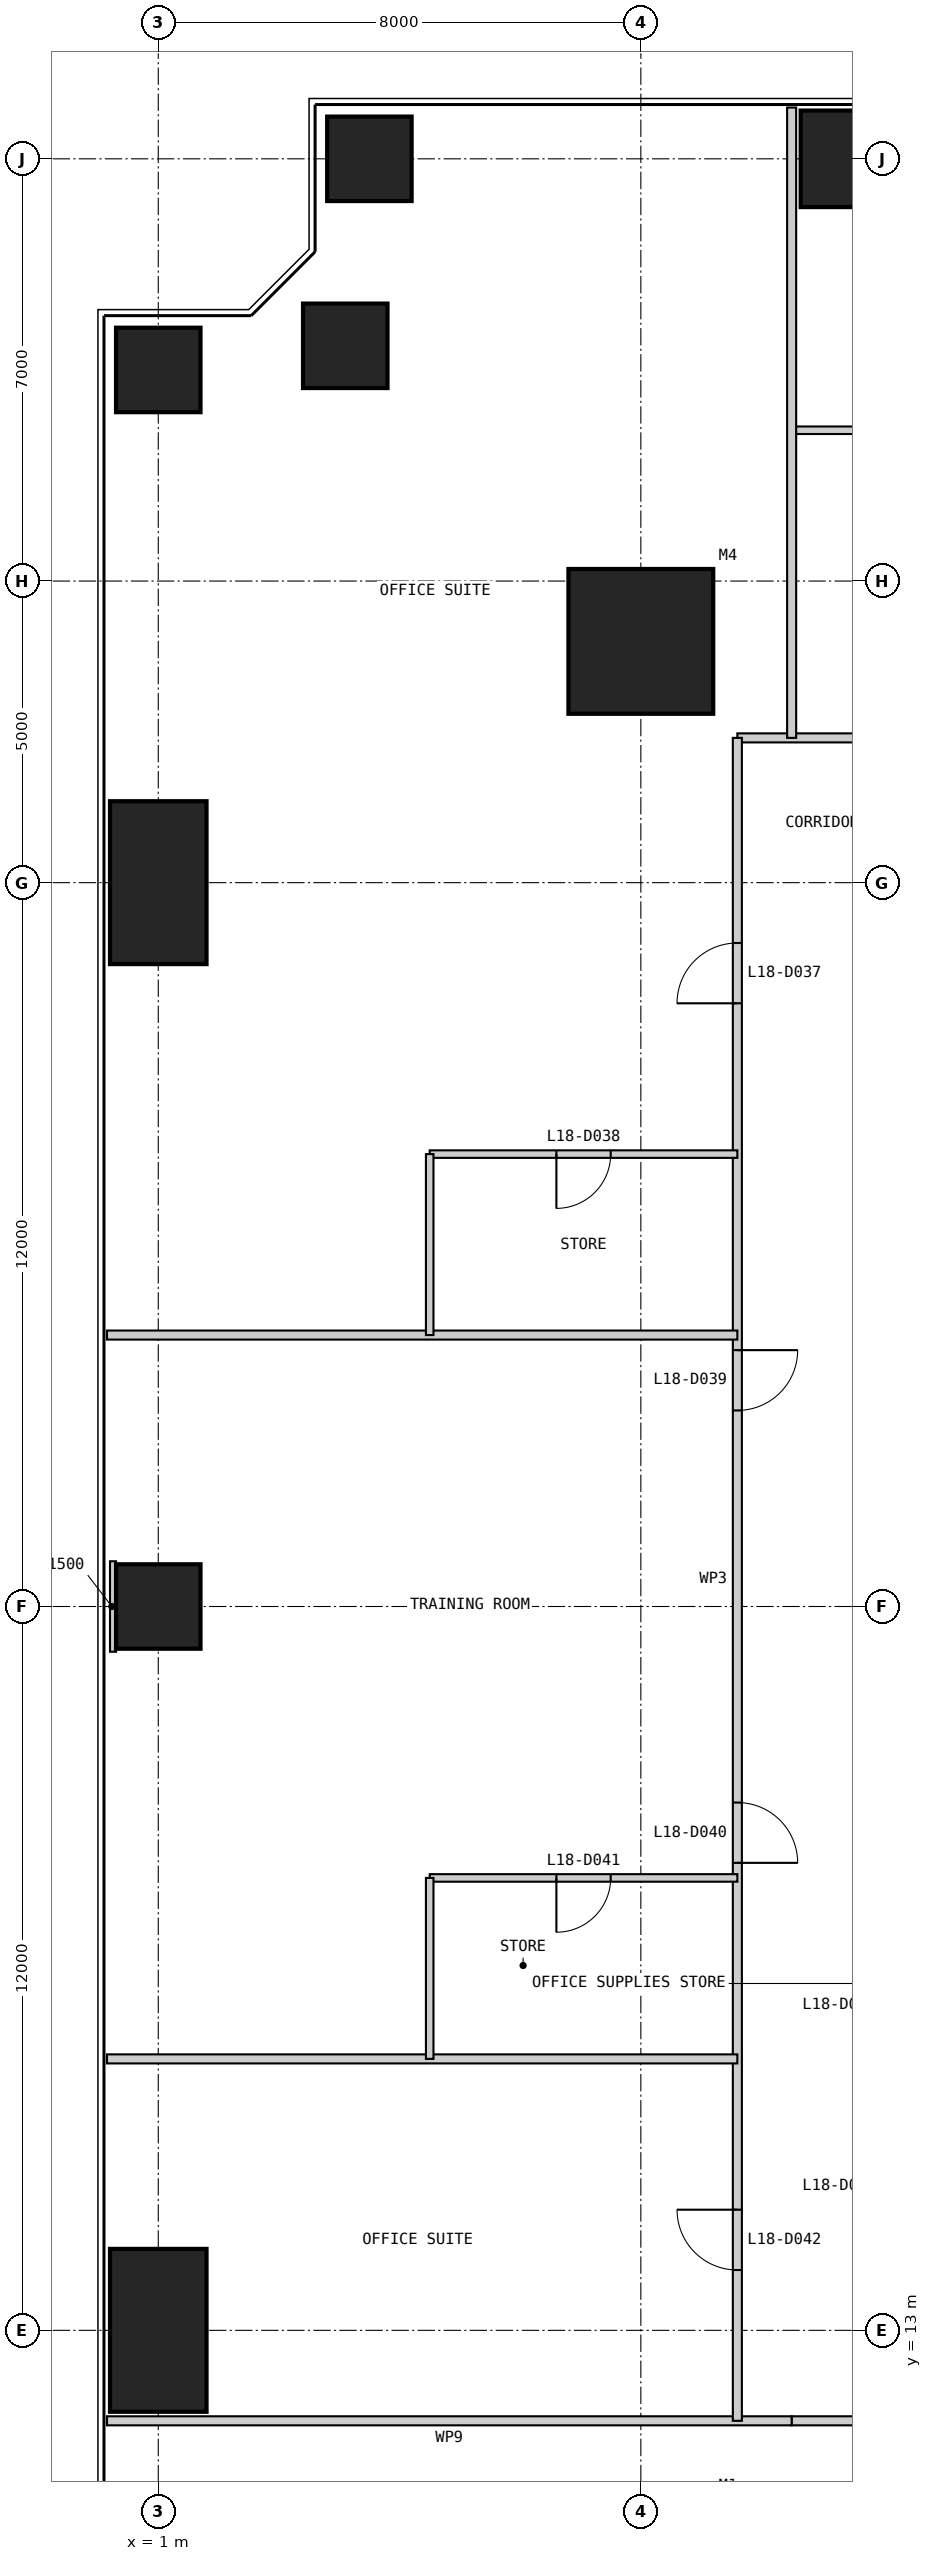
"""IFC4 building model, lengths in metres.
Left out: names, types, materials, properties, quantities, classifications, styles, units other than length and angle.
Written with IfcOpenShell. Run it as: python <this file> out.ifc"""

import sys

from ifc_helpers import new_model, si_unit, direction, frame, frame_2d, origin, origin_2d, place, context, subcontext, project, spatial, rectangle, extrude, element, fill, save


model = new_model("IFC4")
c1 = context("Model", 3, precision=1e-05, world=origin(), true_north=direction((0.0, 1.0)))
c2 = subcontext(c1, "Body", "Model", "MODEL_VIEW")
j1 = project(units=[si_unit("LENGTHUNIT", "METRE"), si_unit("PLANEANGLEUNIT", "RADIAN")], contexts=[c1])
p1 = place(None, origin())
s1 = spatial("IfcSite", under=j1, at=p1, CompositionType="ELEMENT")
p2 = place(p1, origin())
s2 = spatial("IfcBuilding", under=s1, at=p2, CompositionType="ELEMENT")
p3 = place(p2, frame((0.0, 0.0, 79.0)))
s3 = spatial("IfcBuildingStorey", under=s2, at=p3, CompositionType="ELEMENT", Elevation=79.0)
p4 = place(p3, frame((9.0, 41.0, 0.0), z_axis=(0.0, 0.0, 1.0), x_axis=(1.0, 0.0, 0.0)))
e1 = element("IfcColumn", 1, at=p4, inside=s3, PredefinedType="COLUMN", context=c2, shape_type="SweptSolid", body=[
    extrude(rectangle(XDim=2.4, YDim=2.4, at=origin_2d()), origin(), (0.0, 0.0, 1.0), 4.0),
])
p5 = place(p3, frame((13.0, 49.0, 0.0), z_axis=(0.0, 0.0, 1.0), x_axis=(1.0, 0.0, 0.0)))
e2 = element("IfcColumn", 2, at=p5, inside=s3, PredefinedType="COLUMN", context=c2, shape_type="SweptSolid", body=[
    extrude(rectangle(XDim=2.7, YDim=1.6, at=origin_2d()), origin(), (0.0, 0.0, 1.0), 4.0),
])
for number, where, z_axis, x_axis in (
    (3, (4.5, 49.0, 0.0), (0.0, 0.0, 1.0), (1.0, 0.0, 0.0)),
    (4, (4.1, 45.9, 0.0), (0.0, 0.0, 1.0), (1.0, 0.0, 0.0)),
    (5, (1.0, 45.5, 0.0), (0.0, 0.0, 1.0), (1.0, 0.0, 0.0)),
):
    element("IfcColumn", number, at=place(p3, frame(where, z_axis=z_axis, x_axis=x_axis)), inside=s3, PredefinedType="COLUMN", context=c2, shape_type="SweptSolid", body=[
        extrude(rectangle(XDim=1.4, YDim=1.4, at=origin_2d()), origin(), (0.0, 0.0, 1.0), 4.0),
    ])
p6 = place(p3, frame((1.0, 37.0, 0.0), z_axis=(0.0, 0.0, 1.0), x_axis=(1.0, 0.0, 0.0)))
e6 = element("IfcColumn", 6, at=p6, inside=s3, PredefinedType="COLUMN", context=c2, shape_type="SweptSolid", body=[
    extrude(rectangle(XDim=1.6, YDim=2.7, at=origin_2d()), origin(), (0.0, 0.0, 1.0), 4.0),
])
p7 = place(p3, frame((1.0, 25.0, 0.0), z_axis=(0.0, 0.0, 1.0), x_axis=(1.0, 0.0, 0.0)))
e7 = element("IfcColumn", 7, at=p7, inside=s3, PredefinedType="COLUMN", context=c2, shape_type="SweptSolid", body=[
    extrude(rectangle(XDim=1.4, YDim=1.4, at=origin_2d()), origin(), (0.0, 0.0, 1.0), 4.0),
])
p8 = place(p3, frame((1.0, 13.0, 0.0), z_axis=(0.0, 0.0, 1.0), x_axis=(1.0, 0.0, 0.0)))
e8 = element("IfcColumn", 8, at=p8, inside=s3, PredefinedType="COLUMN", context=c2, shape_type="SweptSolid", body=[
    extrude(rectangle(XDim=1.6, YDim=2.7, at=origin_2d()), origin(), (0.0, 0.0, 1.0), 4.0),
])
p9 = place(p3, frame((11.5, 11.5, 0.0), z_axis=(0.0, 0.0, 1.0), x_axis=(1.0, 0.0, 0.0)))
e9 = element("IfcWall", 9, at=p9, inside=s3, PredefinedType="PARTITIONING", context=c2, shape_type="SweptSolid", body=[
    extrude(rectangle(XDim=27.0, YDim=0.15, at=frame_2d((13.5, 0.0))), origin(), (0.0, 0.0, 1.0), 3.85),
])
p10 = place(p9, frame((11.5, 0.0, 0.0)))
e10 = element("IfcOpeningElement", 10, at=p10, cuts=e9, PredefinedType="OPENING", context=c2, shape_type="SweptSolid", body=[
    extrude(rectangle(XDim=1.0, YDim=2.2, at=frame_2d((0.5, 1.1))), frame((0.0, 0.085, 0.0), z_axis=(0.0, -1.0, 0.0), x_axis=(1.0, 0.0, 0.0)), (0.0, 0.0, 1.0), 0.17),
])
p11 = place(p3, frame((0.15, 11.5, 0.0), z_axis=(0.0, 0.0, 1.0), x_axis=(1.0, 0.0, 0.0)))
e11 = element("IfcWall", 11, at=p11, inside=s3, PredefinedType="PARTITIONING", context=c2, shape_type="SweptSolid", body=[
    extrude(rectangle(XDim=11.35, YDim=0.15, at=frame_2d((5.675, 0.0))), origin(), (0.0, 0.0, 1.0), 3.85),
])
p12 = place(p3, frame((39.4, 39.4, 0.0), z_axis=(0.0, 0.0, 1.0), x_axis=(-1.0, 0.0, 0.0)))
e12 = element("IfcWall", 12, at=p12, inside=s3, PredefinedType="PARTITIONING", context=c2, shape_type="SweptSolid", body=[
    extrude(rectangle(XDim=28.8, YDim=0.15, at=frame_2d((14.4, 0.0))), origin(), (0.0, 0.0, 1.0), 3.85),
])
p13 = place(p12, frame((1.15, 0.0, 0.0)))
e13 = element("IfcOpeningElement", 13, at=p13, cuts=e12, PredefinedType="OPENING", context=c2, shape_type="SweptSolid", body=[
    extrude(rectangle(XDim=1.0, YDim=2.2, at=frame_2d((0.5, 1.1))), frame((0.0, 0.085, 0.0), z_axis=(0.0, -1.0, 0.0), x_axis=(1.0, 0.0, 0.0)), (0.0, 0.0, 1.0), 0.17),
])
p14 = place(p12, frame((23.65, 0.0, 0.0)))
e14 = element("IfcOpeningElement", 14, at=p14, cuts=e12, PredefinedType="OPENING", context=c2, shape_type="SweptSolid", body=[
    extrude(rectangle(XDim=1.0, YDim=2.2, at=frame_2d((0.5, 1.1))), frame((0.0, 0.085, 0.0), z_axis=(0.0, -1.0, 0.0), x_axis=(1.0, 0.0, 0.0)), (0.0, 0.0, 1.0), 0.17),
])
p15 = place(p3, frame((29.5, 44.5, 0.0), z_axis=(0.0, 0.0, 1.0), x_axis=(-1.0, 0.0, 0.0)))
e15 = element("IfcWall", 15, at=p15, inside=s3, PredefinedType="PARTITIONING", context=c2, shape_type="SweptSolid", body=[
    extrude(rectangle(XDim=18.0, YDim=0.125, at=frame_2d((9.0, 0.0))), origin(), (0.0, 0.0, 1.0), 3.85),
])
p16 = place(p15, frame((10.0, 0.0, 0.0)))
e16 = element("IfcOpeningElement", 16, at=p16, cuts=e15, PredefinedType="OPENING", context=c2, shape_type="SweptSolid", body=[
    extrude(rectangle(XDim=1.0, YDim=2.2, at=frame_2d((0.5, 1.1))), frame((0.0, 0.073, 0.0), z_axis=(0.0, -1.0, 0.0), x_axis=(1.0, 0.0, 0.0)), (0.0, 0.0, 1.0), 0.145),
])
p17 = place(p15, frame((13.05, 0.0, 0.0)))
e17 = element("IfcOpeningElement", 17, at=p17, cuts=e15, PredefinedType="OPENING", context=c2, shape_type="SweptSolid", body=[
    extrude(rectangle(XDim=0.9, YDim=2.2, at=frame_2d((0.45, 1.1))), frame((0.0, 0.073, 0.0), z_axis=(0.0, -1.0, 0.0), x_axis=(1.0, 0.0, 0.0)), (0.0, 0.0, 1.0), 0.145),
])
p18 = place(p3, frame((10.6, 39.4, 0.0), z_axis=(0.0, 0.0, 1.0), x_axis=(0.0, -1.0, 0.0)))
e18 = element("IfcWall", 18, at=p18, inside=s3, PredefinedType="PARTITIONING", context=c2, shape_type="SweptSolid", body=[
    extrude(rectangle(XDim=27.9, YDim=0.15, at=frame_2d((13.95, 0.0))), origin(), (0.0, 0.0, 1.0), 3.85),
])
p19 = place(p18, frame((3.4, 0.0, 0.0)))
e19 = element("IfcOpeningElement", 19, at=p19, cuts=e18, PredefinedType="OPENING", context=c2, shape_type="SweptSolid", body=[
    extrude(rectangle(XDim=1.0, YDim=2.2, at=frame_2d((0.5, 1.1))), frame((0.0, 0.085, 0.0), z_axis=(0.0, -1.0, 0.0), x_axis=(1.0, 0.0, 0.0)), (0.0, 0.0, 1.0), 0.17),
])
p20 = place(p18, frame((10.15, 0.0, 0.0)))
e20 = element("IfcOpeningElement", 20, at=p20, cuts=e18, PredefinedType="OPENING", context=c2, shape_type="SweptSolid", body=[
    extrude(rectangle(XDim=1.0, YDim=2.2, at=frame_2d((0.5, 1.1))), frame((0.0, 0.085, 0.0), z_axis=(0.0, -1.0, 0.0), x_axis=(1.0, 0.0, 0.0)), (0.0, 0.0, 1.0), 0.17),
])
p21 = place(p18, frame((17.65, 0.0, 0.0)))
e21 = element("IfcOpeningElement", 21, at=p21, cuts=e18, PredefinedType="OPENING", context=c2, shape_type="SweptSolid", body=[
    extrude(rectangle(XDim=1.0, YDim=2.2, at=frame_2d((0.5, 1.1))), frame((0.0, 0.085, 0.0), z_axis=(0.0, -1.0, 0.0), x_axis=(1.0, 0.0, 0.0)), (0.0, 0.0, 1.0), 0.17),
])
p22 = place(p18, frame((24.4, 0.0, 0.0)))
e22 = element("IfcOpeningElement", 22, at=p22, cuts=e18, PredefinedType="OPENING", context=c2, shape_type="SweptSolid", body=[
    extrude(rectangle(XDim=1.0, YDim=2.2, at=frame_2d((0.5, 1.1))), frame((0.0, 0.085, 0.0), z_axis=(0.0, -1.0, 0.0), x_axis=(1.0, 0.0, 0.0)), (0.0, 0.0, 1.0), 0.17),
])
p23 = place(p3, frame((11.5, 49.85, 0.0), z_axis=(0.0, 0.0, 1.0), x_axis=(0.0, -1.0, 0.0)))
e23 = element("IfcWall", 23, at=p23, inside=s3, PredefinedType="PARTITIONING", context=c2, shape_type="SweptSolid", body=[
    extrude(rectangle(XDim=10.45, YDim=0.15, at=frame_2d((5.225, 0.0))), origin(), (0.0, 0.0, 1.0), 3.85),
])
p24 = place(p3, frame((5.5, 32.5, 0.0), z_axis=(0.0, 0.0, 1.0), x_axis=(1.0, 0.0, 0.0)))
e24 = element("IfcWall", 24, at=p24, inside=s3, PredefinedType="PARTITIONING", context=c2, shape_type="SweptSolid", body=[
    extrude(rectangle(XDim=5.1, YDim=0.125, at=frame_2d((2.55, 0.0))), origin(), (0.0, 0.0, 1.0), 3.85),
])
p25 = place(p24, frame((2.1, 0.0, 0.0)))
e25 = element("IfcOpeningElement", 25, at=p25, cuts=e24, PredefinedType="OPENING", context=c2, shape_type="SweptSolid", body=[
    extrude(rectangle(XDim=0.9, YDim=2.2, at=frame_2d((0.45, 1.1))), frame((0.0, 0.073, 0.0), z_axis=(0.0, -1.0, 0.0), x_axis=(1.0, 0.0, 0.0)), (0.0, 0.0, 1.0), 0.145),
])
p26 = place(p3, frame((0.15, 29.5, 0.0), z_axis=(0.0, 0.0, 1.0), x_axis=(1.0, 0.0, 0.0)))
e26 = element("IfcWall", 26, at=p26, inside=s3, PredefinedType="PARTITIONING", context=c2, shape_type="SweptSolid", body=[
    extrude(rectangle(XDim=10.45, YDim=0.15, at=frame_2d((5.225, 0.0))), origin(), (0.0, 0.0, 1.0), 3.85),
])
p27 = place(p3, frame((5.5, 20.5, 0.0), z_axis=(0.0, 0.0, 1.0), x_axis=(1.0, 0.0, 0.0)))
e27 = element("IfcWall", 27, at=p27, inside=s3, PredefinedType="PARTITIONING", context=c2, shape_type="SweptSolid", body=[
    extrude(rectangle(XDim=5.1, YDim=0.125, at=frame_2d((2.55, 0.0))), origin(), (0.0, 0.0, 1.0), 3.85),
])
p28 = place(p27, frame((2.1, 0.0, 0.0)))
e28 = element("IfcOpeningElement", 28, at=p28, cuts=e27, PredefinedType="OPENING", context=c2, shape_type="SweptSolid", body=[
    extrude(rectangle(XDim=0.9, YDim=2.2, at=frame_2d((0.45, 1.1))), frame((0.0, 0.073, 0.0), z_axis=(0.0, -1.0, 0.0), x_axis=(1.0, 0.0, 0.0)), (0.0, 0.0, 1.0), 0.145),
])
p29 = place(p3, frame((0.15, 17.5, 0.0), z_axis=(0.0, 0.0, 1.0), x_axis=(1.0, 0.0, 0.0)))
e29 = element("IfcWall", 29, at=p29, inside=s3, PredefinedType="PARTITIONING", context=c2, shape_type="SweptSolid", body=[
    extrude(rectangle(XDim=10.45, YDim=0.15, at=frame_2d((5.225, 0.0))), origin(), (0.0, 0.0, 1.0), 3.85),
])
for number, where, z_axis, x_axis in (
    (30, (5.5, 32.5, 0.0), (0.0, 0.0, 1.0), (0.0, -1.0, 0.0)),
    (31, (5.5, 20.5, 0.0), (0.0, 0.0, 1.0), (0.0, -1.0, 0.0)),
):
    element("IfcWall", number, at=place(p3, frame(where, z_axis=z_axis, x_axis=x_axis)), inside=s3, PredefinedType="PARTITIONING", context=c2, shape_type="SweptSolid", body=[
        extrude(rectangle(XDim=3.0, YDim=0.125, at=frame_2d((1.5, 0.0))), origin(), (0.0, 0.0, 1.0), 3.85),
    ])
p30 = place(p3, frame((0.2, 25.0, 0.0), z_axis=(0.0, 0.0, 1.0), x_axis=(1.0, 0.0, 0.0)))
e32 = element("IfcWall", 32, at=p30, inside=s3, PredefinedType="PARTITIONING", context=c2, shape_type="SweptSolid", body=[
    extrude(rectangle(XDim=0.1, YDim=1.5, at=frame_2d((0.05, 0.0))), origin(), (0.0, 0.0, 1.0), 3.85),
])
p31 = place(p19, frame((1.0, 0.0, 0.0), z_axis=(0.0, 0.0, 1.0), x_axis=(-1.0, 0.0, 0.0)))
e33 = element("IfcDoor", 33, at=p31, inside=s3, OperationType="SINGLE_SWING_LEFT", PredefinedType="DOOR", context=c2, shape_type="SweptSolid", body=[
    extrude(rectangle(XDim=1.0, YDim=2.2, at=frame_2d((0.5, 1.1))), frame((0.0, 0.025, 0.0), z_axis=(0.0, -1.0, 0.0), x_axis=(1.0, 0.0, 0.0)), (0.0, 0.0, 1.0), 0.05),
])
fill(e19, e33)
p32 = place(p25, frame((0.9, 0.0, 0.0), z_axis=(0.0, 0.0, 1.0), x_axis=(-1.0, 0.0, 0.0)))
e34 = element("IfcDoor", 34, at=p32, inside=s3, OperationType="SINGLE_SWING_RIGHT", PredefinedType="DOOR", context=c2, shape_type="SweptSolid", body=[
    extrude(rectangle(XDim=0.9, YDim=2.2, at=frame_2d((0.45, 1.1))), frame((0.0, 0.025, 0.0), z_axis=(0.0, -1.0, 0.0), x_axis=(1.0, 0.0, 0.0)), (0.0, 0.0, 1.0), 0.05),
])
fill(e25, e34)
p33 = place(p20, origin())
e35 = element("IfcDoor", 35, at=p33, inside=s3, OperationType="SINGLE_SWING_LEFT", PredefinedType="DOOR", context=c2, shape_type="SweptSolid", body=[
    extrude(rectangle(XDim=1.0, YDim=2.2, at=frame_2d((0.5, 1.1))), frame((0.0, 0.025, 0.0), z_axis=(0.0, -1.0, 0.0), x_axis=(1.0, 0.0, 0.0)), (0.0, 0.0, 1.0), 0.05),
])
fill(e20, e35)
p34 = place(p21, origin())
e36 = element("IfcDoor", 36, at=p34, inside=s3, OperationType="SINGLE_SWING_RIGHT", PredefinedType="DOOR", context=c2, shape_type="SweptSolid", body=[
    extrude(rectangle(XDim=1.0, YDim=2.2, at=frame_2d((0.5, 1.1))), frame((0.0, 0.025, 0.0), z_axis=(0.0, -1.0, 0.0), x_axis=(1.0, 0.0, 0.0)), (0.0, 0.0, 1.0), 0.05),
])
fill(e21, e36)
p35 = place(p28, frame((0.9, 0.0, 0.0), z_axis=(0.0, 0.0, 1.0), x_axis=(-1.0, 0.0, 0.0)))
e37 = element("IfcDoor", 37, at=p35, inside=s3, OperationType="SINGLE_SWING_RIGHT", PredefinedType="DOOR", context=c2, shape_type="SweptSolid", body=[
    extrude(rectangle(XDim=0.9, YDim=2.2, at=frame_2d((0.45, 1.1))), frame((0.0, 0.025, 0.0), z_axis=(0.0, -1.0, 0.0), x_axis=(1.0, 0.0, 0.0)), (0.0, 0.0, 1.0), 0.05),
])
fill(e28, e37)
p36 = place(p22, frame((1.0, 0.0, 0.0), z_axis=(0.0, 0.0, 1.0), x_axis=(-1.0, 0.0, 0.0)))
e38 = element("IfcDoor", 38, at=p36, inside=s3, OperationType="SINGLE_SWING_RIGHT", PredefinedType="DOOR", context=c2, shape_type="SweptSolid", body=[
    extrude(rectangle(XDim=1.0, YDim=2.2, at=frame_2d((0.5, 1.1))), frame((0.0, 0.025, 0.0), z_axis=(0.0, -1.0, 0.0), x_axis=(1.0, 0.0, 0.0)), (0.0, 0.0, 1.0), 0.05),
])
fill(e22, e38)
save(model, sys.argv[1])
